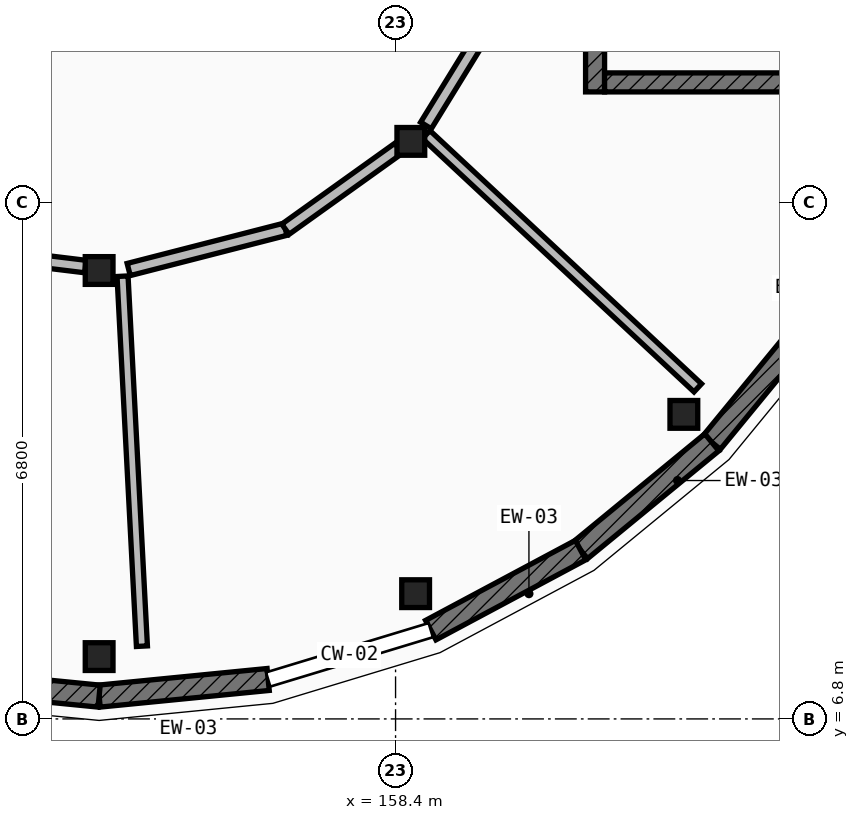
"""IFC4 building model, lengths in metres.
Left out: names, types, materials, properties, quantities, classifications, styles, units other than length and angle.
Written with IfcOpenShell. Run it as: python <this file> out.ifc"""

import sys

from ifc_helpers import new_model, si_unit, direction, frame, frame_2d, origin, origin_2d, place, context, subcontext, project, spatial, rectangle, extrude, element, fill, save


model = new_model("IFC4")
c1 = context("Model", 3, precision=1e-05, world=origin(), true_north=direction((0.0, 1.0)))
c2 = subcontext(c1, "Body", "Model", "MODEL_VIEW")
j1 = project(units=[si_unit("LENGTHUNIT", "METRE"), si_unit("PLANEANGLEUNIT", "RADIAN")], contexts=[c1])
p1 = place(None, origin())
s1 = spatial("IfcSite", under=j1, at=p1, CompositionType="ELEMENT")
p2 = place(p1, origin())
s2 = spatial("IfcBuilding", under=s1, at=p2, CompositionType="ELEMENT")
p3 = place(p2, frame((0.0, 0.0, 4.55)))
s3 = spatial("IfcBuildingStorey", under=s2, at=p3, CompositionType="ELEMENT", Elevation=4.55)
for number, where, z_axis, x_axis in (
    (1, (154.5, 7.62, 0.0), (0.0, 0.0, 1.0), (1.0, 0.0, 0.0)),
    (2, (158.664, 8.448, 0.0), (0.0, 0.0, 1.0), (1.0, 0.0, 0.0)),
    (3, (162.193, 10.807, 0.0), (0.0, 0.0, 1.0), (1.0, 0.0, 0.0)),
    (4, (154.5, 12.7, 0.0), (0.0, 0.0, 1.0), (1.0, 0.0, 0.0)),
    (5, (158.601, 14.399, 0.0), (0.0, 0.0, 1.0), (1.0, 0.0, 0.0)),
):
    element("IfcColumn", number, at=place(p3, frame(where, z_axis=z_axis, x_axis=x_axis)), inside=s3, PredefinedType="COLUMN", context=c2, shape_type="SweptSolid", body=[
        extrude(rectangle(XDim=0.365, YDim=0.365, at=origin_2d()), origin(), (0.0, 0.0, 1.0), 4.2),
    ])
p4 = place(p3, frame((163.979, 12.166, 0.0), z_axis=(0.0, 0.0, 1.0), x_axis=(-0.63455767339, -0.772875513354, 0.0)))
e6 = element("IfcWall", 6, at=p4, inside=s3, PredefinedType="ELEMENTEDWALL", context=c2, shape_type="SweptSolid", body=[
    extrude(rectangle(XDim=2.235, YDim=0.29, at=frame_2d((1.117, 0.0))), origin(), (0.0, 0.0, 1.0), 3.309),
])
p5 = place(p4, frame((0.367, 0.0, 0.85)))
e7 = element("IfcOpeningElement", 7, at=p5, cuts=e6, PredefinedType="OPENING", context=c2, shape_type="SweptSolid", body=[
    extrude(rectangle(XDim=1.5, YDim=1.3, at=frame_2d((0.75, 0.65))), frame((0.0, 0.155, 0.0), z_axis=(0.0, -1.0, 0.0), x_axis=(1.0, 0.0, 0.0)), (0.0, 0.0, 1.0), 0.31),
])
p6 = place(p3, frame((162.561, 10.439, 0.0), z_axis=(0.0, 0.0, 1.0), x_axis=(-0.772875513354, -0.63455767339, 0.0)))
e8 = element("IfcWall", 8, at=p6, inside=s3, PredefinedType="ELEMENTEDWALL", context=c2, shape_type="SweptSolid", body=[
    extrude(rectangle(XDim=2.235, YDim=0.29, at=frame_2d((1.117, 0.0))), origin(), (0.0, 0.0, 1.0), 3.309),
])
p7 = place(p6, frame((0.367, 0.0, 0.85)))
e9 = element("IfcOpeningElement", 9, at=p7, cuts=e8, PredefinedType="OPENING", context=c2, shape_type="SweptSolid", body=[
    extrude(rectangle(XDim=1.5, YDim=1.65, at=frame_2d((0.75, 0.825))), frame((0.0, 0.155, 0.0), z_axis=(0.0, -1.0, 0.0), x_axis=(1.0, 0.0, 0.0)), (0.0, 0.0, 1.0), 0.31),
])
p8 = place(p3, frame((160.834, 9.021, 0.0), z_axis=(0.0, 0.0, 1.0), x_axis=(-0.882017012185, -0.471217561446, 0.0)))
e10 = element("IfcWall", 10, at=p8, inside=s3, PredefinedType="ELEMENTEDWALL", context=c2, shape_type="SweptSolid", body=[
    extrude(rectangle(XDim=2.235, YDim=0.29, at=frame_2d((1.117, 0.0))), origin(), (0.0, 0.0, 1.0), 3.309),
])
p9 = place(p8, frame((0.367, 0.0, 0.85)))
e11 = element("IfcOpeningElement", 11, at=p9, cuts=e10, PredefinedType="OPENING", context=c2, shape_type="SweptSolid", body=[
    extrude(rectangle(XDim=1.5, YDim=1.95, at=frame_2d((0.75, 0.975))), frame((0.0, 0.155, 0.0), z_axis=(0.0, -1.0, 0.0), x_axis=(1.0, 0.0, 0.0)), (0.0, 0.0, 1.0), 0.31),
])
p10 = place(p3, frame((156.724, 7.319, 0.0), z_axis=(0.0, 0.0, 1.0), x_axis=(-0.995187461503, -0.097989369151, 0.0)))
e12 = element("IfcWall", 12, at=p10, inside=s3, PredefinedType="ELEMENTEDWALL", context=c2, shape_type="SweptSolid", body=[
    extrude(rectangle(XDim=2.235, YDim=0.29, at=frame_2d((1.117, 0.0))), origin(), (0.0, 0.0, 1.0), 3.309),
])
p11 = place(p10, frame((0.342, 0.0, 0.85)))
e13 = element("IfcOpeningElement", 13, at=p11, cuts=e12, PredefinedType="OPENING", context=c2, shape_type="SweptSolid", body=[
    extrude(rectangle(XDim=1.55, YDim=1.5, at=frame_2d((0.775, 0.75))), frame((0.0, 0.155, 0.0), z_axis=(0.0, -1.0, 0.0), x_axis=(1.0, 0.0, 0.0)), (0.0, 0.0, 1.0), 0.31),
])
p12 = place(p3, frame((154.5, 7.1, 0.0), z_axis=(0.0, 0.0, 1.0), x_axis=(-0.995187461503, 0.097989369151, 0.0)))
e14 = element("IfcWall", 14, at=p12, inside=s3, PredefinedType="ELEMENTEDWALL", context=c2, shape_type="SweptSolid", body=[
    extrude(rectangle(XDim=2.235, YDim=0.29, at=frame_2d((1.117, 0.0))), origin(), (0.0, 0.0, 1.0), 3.309),
])
p13 = place(p12, frame((0.342, 0.0, 0.85)))
e15 = element("IfcOpeningElement", 15, at=p13, cuts=e14, PredefinedType="OPENING", context=c2, shape_type="SweptSolid", body=[
    extrude(rectangle(XDim=1.55, YDim=1.8, at=frame_2d((0.775, 0.9))), frame((0.0, 0.155, 0.0), z_axis=(0.0, -1.0, 0.0), x_axis=(1.0, 0.0, 0.0)), (0.0, 0.0, 1.0), 0.31),
])
p14 = place(p3, frame((161.025, 21.95, 0.0), z_axis=(0.0, 0.0, 1.0), x_axis=(0.0, -1.0, 0.0)))
e16 = element("IfcWall", 16, at=p14, inside=s3, PredefinedType="SHEAR", context=c2, shape_type="SweptSolid", body=[
    extrude(rectangle(XDim=6.9, YDim=0.25, at=frame_2d((3.45, 0.0))), origin(), (0.0, 0.0, 1.0), 3.955),
])
p15 = place(p14, frame((0.43, 0.0, 0.0)))
e17 = element("IfcOpeningElement", 17, at=p15, cuts=e16, PredefinedType="OPENING", context=c2, shape_type="SweptSolid", body=[
    extrude(rectangle(XDim=1.1, YDim=2.15, at=frame_2d((0.55, 1.075))), frame((0.0, 0.135, 0.0), z_axis=(0.0, -1.0, 0.0), x_axis=(1.0, 0.0, 0.0)), (0.0, 0.0, 1.0), 0.27),
])
p16 = place(p3, frame((161.15, 15.175, 0.0), z_axis=(0.0, 0.0, 1.0), x_axis=(1.0, 0.0, 0.0)))
e18 = element("IfcWall", 18, at=p16, inside=s3, PredefinedType="SHEAR", context=c2, shape_type="SweptSolid", body=[
    extrude(rectangle(XDim=2.9, YDim=0.25, at=frame_2d((1.45, 0.0))), origin(), (0.0, 0.0, 1.0), 3.955),
])
p17 = place(p3, frame((154.808, 12.625, 0.0), z_axis=(0.0, 0.0, 1.0), x_axis=(0.05228807127, -0.998632043148, 0.0)))
e19 = element("IfcWall", 19, at=p17, inside=s3, PredefinedType="PARTITIONING", context=c2, shape_type="SweptSolid", body=[
    extrude(rectangle(XDim=4.875, YDim=0.145, at=frame_2d((2.437, 0.0))), origin(), (0.0, 0.0, 1.0), 3.284),
])
p18 = place(p3, frame((158.803, 14.488, 0.0), z_axis=(0.0, 0.0, 1.0), x_axis=(0.731337706655, -0.682015512158, 0.0)))
e20 = element("IfcWall", 20, at=p18, inside=s3, PredefinedType="PARTITIONING", context=c2, shape_type="SweptSolid", body=[
    extrude(rectangle(XDim=4.885, YDim=0.145, at=frame_2d((2.443, 0.0))), origin(), (0.0, 0.0, 1.0), 3.284),
])
p19 = place(p3, frame((152.901, 12.925, 0.0), z_axis=(0.0, 0.0, 1.0), x_axis=(0.992643875507, -0.12107079094, 0.0)))
e21 = element("IfcWall", 21, at=p19, inside=s3, PredefinedType="PARTITIONING", context=c2, shape_type="SweptSolid", body=[
    extrude(rectangle(XDim=1.43, YDim=0.165, at=frame_2d((0.715, 0.0))), origin(), (0.0, 0.0, 1.0), 3.284),
])
p20 = place(p3, frame((154.889, 12.713, 0.0), z_axis=(0.0, 0.0, 1.0), x_axis=(0.968515845244, 0.248951918071, 0.0)))
e22 = element("IfcWall", 22, at=p20, inside=s3, PredefinedType="PARTITIONING", context=c2, shape_type="SweptSolid", body=[
    extrude(rectangle(XDim=2.129, YDim=0.165, at=frame_2d((1.064, 0.0))), origin(), (0.0, 0.0, 1.0), 3.284),
])
p21 = place(p20, frame((0.444, 0.0, 0.0)))
e23 = element("IfcOpeningElement", 23, at=p21, cuts=e22, PredefinedType="OPENING", context=c2, shape_type="SweptSolid", body=[
    extrude(rectangle(XDim=1.24, YDim=2.22, at=frame_2d((0.62, 1.11))), frame((0.0, 0.093, 0.0), z_axis=(0.0, -1.0, 0.0), x_axis=(1.0, 0.0, 0.0)), (0.0, 0.0, 1.0), 0.185),
])
p22 = place(p3, frame((156.951, 13.243, 0.0), z_axis=(0.0, 0.0, 1.0), x_axis=(0.813273111974, 0.581882157606, 0.0)))
e24 = element("IfcWall", 24, at=p22, inside=s3, PredefinedType="PARTITIONING", context=c2, shape_type="SweptSolid", body=[
    extrude(rectangle(XDim=1.828, YDim=0.165, at=frame_2d((0.914, 0.0))), origin(), (0.0, 0.0, 1.0), 3.284),
])
p23 = place(p3, frame((158.8, 14.608, 0.0), z_axis=(0.0, 0.0, 1.0), x_axis=(0.523860609665, 0.851804004241, 0.0)))
e25 = element("IfcWall", 25, at=p23, inside=s3, PredefinedType="PARTITIONING", context=c2, shape_type="SweptSolid", body=[
    extrude(rectangle(XDim=2.128, YDim=0.165, at=frame_2d((1.064, 0.0))), origin(), (0.0, 0.0, 1.0), 3.284),
])
p24 = place(p23, frame((0.424, 0.0, 0.0)))
e26 = element("IfcOpeningElement", 26, at=p24, cuts=e25, PredefinedType="OPENING", context=c2, shape_type="SweptSolid", body=[
    extrude(rectangle(XDim=1.28, YDim=2.3, at=frame_2d((0.64, 1.15))), frame((0.0, 0.093, 0.0), z_axis=(0.0, -1.0, 0.0), x_axis=(1.0, 0.0, 0.0)), (0.0, 0.0, 1.0), 0.185),
])
p25 = place(p5, origin())
e27 = element("IfcWindow", 27, at=p25, inside=s3, PartitioningType="SINGLE_PANEL", PredefinedType="WINDOW", context=c2, shape_type="SweptSolid", body=[
    extrude(rectangle(XDim=1.5, YDim=1.3, at=frame_2d((0.75, 0.65))), frame((0.0, 0.03, 0.0), z_axis=(0.0, -1.0, 0.0), x_axis=(1.0, 0.0, 0.0)), (0.0, 0.0, 1.0), 0.06),
])
fill(e7, e27)
p26 = place(p7, origin())
e28 = element("IfcWindow", 28, at=p26, inside=s3, PartitioningType="SINGLE_PANEL", PredefinedType="WINDOW", context=c2, shape_type="SweptSolid", body=[
    extrude(rectangle(XDim=1.5, YDim=1.65, at=frame_2d((0.75, 0.825))), frame((0.0, 0.03, 0.0), z_axis=(0.0, -1.0, 0.0), x_axis=(1.0, 0.0, 0.0)), (0.0, 0.0, 1.0), 0.06),
])
fill(e9, e28)
p27 = place(p9, origin())
e29 = element("IfcWindow", 29, at=p27, inside=s3, PartitioningType="SINGLE_PANEL", PredefinedType="WINDOW", context=c2, shape_type="SweptSolid", body=[
    extrude(rectangle(XDim=1.5, YDim=1.95, at=frame_2d((0.75, 0.975))), frame((0.0, 0.03, 0.0), z_axis=(0.0, -1.0, 0.0), x_axis=(1.0, 0.0, 0.0)), (0.0, 0.0, 1.0), 0.06),
])
fill(e11, e29)
p28 = place(p11, origin())
e30 = element("IfcWindow", 30, at=p28, inside=s3, PartitioningType="SINGLE_PANEL", PredefinedType="WINDOW", context=c2, shape_type="SweptSolid", body=[
    extrude(rectangle(XDim=1.55, YDim=1.5, at=frame_2d((0.775, 0.75))), frame((0.0, 0.03, 0.0), z_axis=(0.0, -1.0, 0.0), x_axis=(1.0, 0.0, 0.0)), (0.0, 0.0, 1.0), 0.06),
])
fill(e13, e30)
p29 = place(p13, origin())
e31 = element("IfcWindow", 31, at=p29, inside=s3, PartitioningType="SINGLE_PANEL", PredefinedType="WINDOW", context=c2, shape_type="SweptSolid", body=[
    extrude(rectangle(XDim=1.55, YDim=1.8, at=frame_2d((0.775, 0.9))), frame((0.0, 0.03, 0.0), z_axis=(0.0, -1.0, 0.0), x_axis=(1.0, 0.0, 0.0)), (0.0, 0.0, 1.0), 0.06),
])
fill(e15, e31)
p30 = place(p21, origin())
e32 = element("IfcDoor", 32, at=p30, inside=s3, OperationType="SINGLE_SWING_LEFT", PredefinedType="DOOR", context=c2, shape_type="SweptSolid", body=[
    extrude(rectangle(XDim=1.24, YDim=2.22, at=frame_2d((0.62, 1.11))), frame((0.0, 0.025, 0.0), z_axis=(0.0, -1.0, 0.0), x_axis=(1.0, 0.0, 0.0)), (0.0, 0.0, 1.0), 0.05),
])
fill(e23, e32)
p31 = place(p24, origin())
e33 = element("IfcDoor", 33, at=p31, inside=s3, OperationType="SINGLE_SWING_RIGHT", PredefinedType="DOOR", context=c2, shape_type="SweptSolid", body=[
    extrude(rectangle(XDim=1.28, YDim=2.3, at=frame_2d((0.64, 1.15))), frame((0.0, 0.025, 0.0), z_axis=(0.0, -1.0, 0.0), x_axis=(1.0, 0.0, 0.0)), (0.0, 0.0, 1.0), 0.05),
])
fill(e26, e33)
save(model, sys.argv[1])
